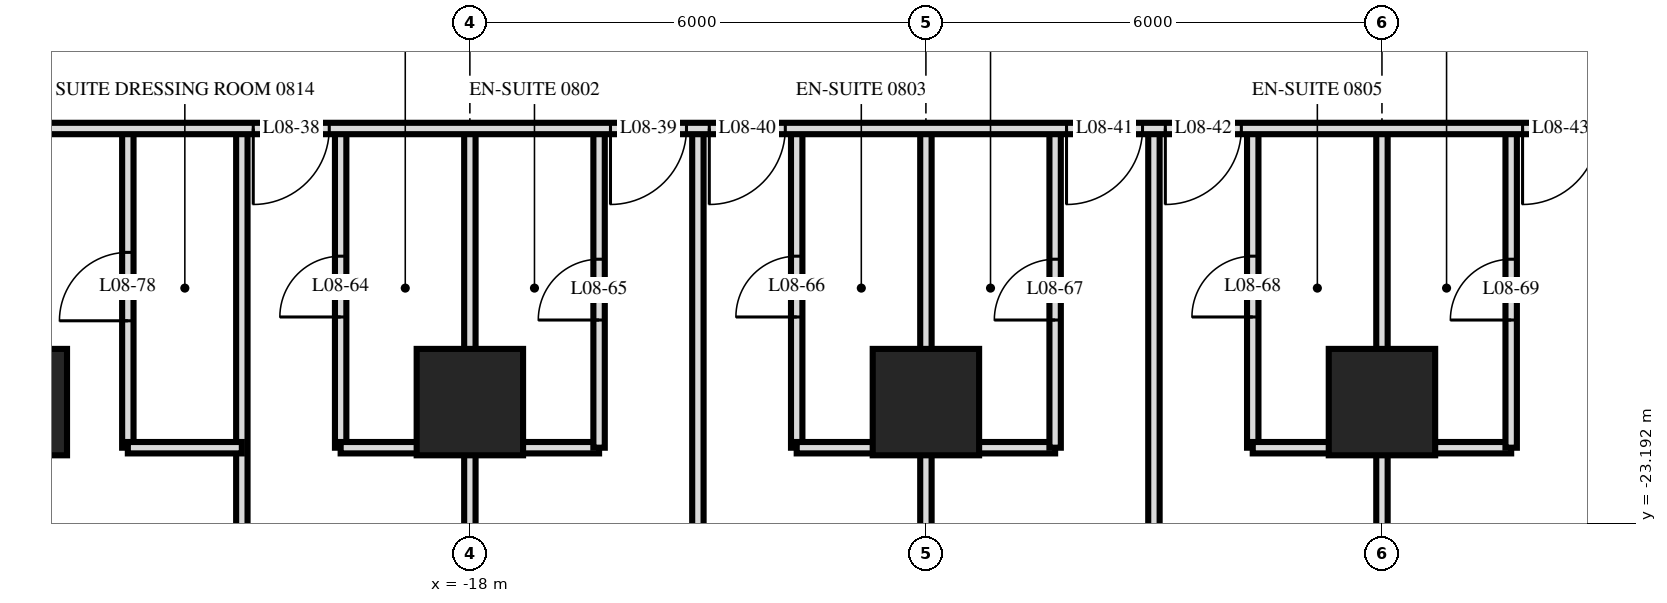
"""IFC4 building model, lengths in metres.
Left out: names, types, materials, properties, quantities, classifications, styles, units other than length and angle.
Written with IfcOpenShell. Run it as: python <this file> out.ifc"""

import sys

from ifc_helpers import new_model, si_unit, direction, frame, frame_2d, origin, origin_2d, place, context, subcontext, project, spatial, rectangle, extrude, element, fill, save


model = new_model("IFC4")
c1 = context("Model", 3, precision=1e-05, world=origin(), true_north=direction((0.0, 1.0)))
c2 = subcontext(c1, "Body", "Model", "MODEL_VIEW")
j1 = project(units=[si_unit("LENGTHUNIT", "METRE"), si_unit("PLANEANGLEUNIT", "RADIAN")], contexts=[c1])
p1 = place(None, origin())
s1 = spatial("IfcSite", under=j1, at=p1, CompositionType="ELEMENT")
p2 = place(p1, origin())
s2 = spatial("IfcBuilding", under=s1, at=p2, CompositionType="ELEMENT")
p3 = place(p2, frame((0.0, 0.0, 38.4)))
s3 = spatial("IfcBuildingStorey", under=s2, at=p3, CompositionType="ELEMENT", Elevation=38.4)
for number, where, z_axis, x_axis in (
    (1, (-24.0, -21.6, 0.0), (0.0, 0.0, 1.0), (1.0, 0.0, 0.0)),
    (2, (-18.0, -21.6, 0.0), (0.0, 0.0, 1.0), (1.0, 0.0, 0.0)),
    (3, (-12.0, -21.6, 0.0), (0.0, 0.0, 1.0), (1.0, 0.0, 0.0)),
    (4, (-6.0, -21.6, 0.0), (0.0, 0.0, 1.0), (1.0, 0.0, 0.0)),
):
    element("IfcColumn", number, at=place(p3, frame(where, z_axis=z_axis, x_axis=x_axis)), inside=s3, PredefinedType="COLUMN", context=c2, shape_type="SweptSolid", body=[
        extrude(rectangle(XDim=1.4, YDim=1.4, at=origin_2d()), origin(), (0.0, 0.0, 1.0), 3.6),
    ])
p4 = place(p3, frame((-4.3, -22.2, 0.0), z_axis=(0.0, 0.0, 1.0), x_axis=(0.0, 1.0, 0.0)))
e5 = element("IfcWall", 5, at=p4, inside=s3, PredefinedType="PARTITIONING", context=c2, shape_type="SweptSolid", body=[
    extrude(rectangle(XDim=4.2, YDim=0.15, at=frame_2d((2.1, 0.0))), origin(), (0.0, 0.0, 1.0), 3.32),
])
p5 = place(p4, frame((1.68, 0.0, 0.0)))
e6 = element("IfcOpeningElement", 6, at=p5, cuts=e5, PredefinedType="OPENING", context=c2, shape_type="SweptSolid", body=[
    extrude(rectangle(XDim=0.8, YDim=2.1, at=frame_2d((0.4, 1.05))), frame((0.0, 0.085, 0.0), z_axis=(0.0, -1.0, 0.0), x_axis=(1.0, 0.0, 0.0)), (0.0, 0.0, 1.0), 0.17),
])
p6 = place(p3, frame((-6.0, -29.22, 0.0), z_axis=(0.0, 0.0, 1.0), x_axis=(0.0, 1.0, 0.0)))
e7 = element("IfcWall", 7, at=p6, inside=s3, PredefinedType="PARTITIONING", context=c2, shape_type="SweptSolid", body=[
    extrude(rectangle(XDim=11.22, YDim=0.15, at=frame_2d((5.61, 0.0))), origin(), (0.0, 0.0, 1.0), 3.32),
])
p7 = place(p3, frame((-7.7, -22.2, 0.0), z_axis=(0.0, 0.0, 1.0), x_axis=(0.0, 1.0, 0.0)))
e8 = element("IfcWall", 8, at=p7, inside=s3, PredefinedType="PARTITIONING", context=c2, shape_type="SweptSolid", body=[
    extrude(rectangle(XDim=4.2, YDim=0.15, at=frame_2d((2.1, 0.0))), origin(), (0.0, 0.0, 1.0), 3.32),
])
p8 = place(p7, frame((1.72, 0.0, 0.0)))
e9 = element("IfcOpeningElement", 9, at=p8, cuts=e8, PredefinedType="OPENING", context=c2, shape_type="SweptSolid", body=[
    extrude(rectangle(XDim=0.8, YDim=2.1, at=frame_2d((0.4, 1.05))), frame((0.0, 0.085, 0.0), z_axis=(0.0, -1.0, 0.0), x_axis=(1.0, 0.0, 0.0)), (0.0, 0.0, 1.0), 0.17),
])
p9 = place(p3, frame((-9.0, -29.22, 0.0), z_axis=(0.0, 0.0, 1.0), x_axis=(0.0, 1.0, 0.0)))
e10 = element("IfcWall", 10, at=p9, inside=s3, PredefinedType="PARTITIONING", context=c2, shape_type="SweptSolid", body=[
    extrude(rectangle(XDim=11.22, YDim=0.15, at=frame_2d((5.61, 0.0))), origin(), (0.0, 0.0, 1.0), 3.32),
])
p10 = place(p3, frame((-10.3, -22.2, 0.0), z_axis=(0.0, 0.0, 1.0), x_axis=(0.0, 1.0, 0.0)))
e11 = element("IfcWall", 11, at=p10, inside=s3, PredefinedType="PARTITIONING", context=c2, shape_type="SweptSolid", body=[
    extrude(rectangle(XDim=4.2, YDim=0.15, at=frame_2d((2.1, 0.0))), origin(), (0.0, 0.0, 1.0), 3.32),
])
p11 = place(p10, frame((1.68, 0.0, 0.0)))
e12 = element("IfcOpeningElement", 12, at=p11, cuts=e11, PredefinedType="OPENING", context=c2, shape_type="SweptSolid", body=[
    extrude(rectangle(XDim=0.8, YDim=2.1, at=frame_2d((0.4, 1.05))), frame((0.0, 0.085, 0.0), z_axis=(0.0, -1.0, 0.0), x_axis=(1.0, 0.0, 0.0)), (0.0, 0.0, 1.0), 0.17),
])
p12 = place(p3, frame((-12.0, -29.22, 0.0), z_axis=(0.0, 0.0, 1.0), x_axis=(0.0, 1.0, 0.0)))
e13 = element("IfcWall", 13, at=p12, inside=s3, PredefinedType="PARTITIONING", context=c2, shape_type="SweptSolid", body=[
    extrude(rectangle(XDim=11.22, YDim=0.15, at=frame_2d((5.61, 0.0))), origin(), (0.0, 0.0, 1.0), 3.32),
])
p13 = place(p3, frame((-13.7, -22.2, 0.0), z_axis=(0.0, 0.0, 1.0), x_axis=(0.0, 1.0, 0.0)))
e14 = element("IfcWall", 14, at=p13, inside=s3, PredefinedType="PARTITIONING", context=c2, shape_type="SweptSolid", body=[
    extrude(rectangle(XDim=4.2, YDim=0.15, at=frame_2d((2.1, 0.0))), origin(), (0.0, 0.0, 1.0), 3.32),
])
p14 = place(p13, frame((1.72, 0.0, 0.0)))
e15 = element("IfcOpeningElement", 15, at=p14, cuts=e14, PredefinedType="OPENING", context=c2, shape_type="SweptSolid", body=[
    extrude(rectangle(XDim=0.8, YDim=2.1, at=frame_2d((0.4, 1.05))), frame((0.0, 0.085, 0.0), z_axis=(0.0, -1.0, 0.0), x_axis=(1.0, 0.0, 0.0)), (0.0, 0.0, 1.0), 0.17),
])
p15 = place(p3, frame((-15.0, -29.22, 0.0), z_axis=(0.0, 0.0, 1.0), x_axis=(0.0, 1.0, 0.0)))
e16 = element("IfcWall", 16, at=p15, inside=s3, PredefinedType="PARTITIONING", context=c2, shape_type="SweptSolid", body=[
    extrude(rectangle(XDim=11.22, YDim=0.15, at=frame_2d((5.61, 0.0))), origin(), (0.0, 0.0, 1.0), 3.32),
])
p16 = place(p3, frame((-16.3, -22.2, 0.0), z_axis=(0.0, 0.0, 1.0), x_axis=(0.0, 1.0, 0.0)))
e17 = element("IfcWall", 17, at=p16, inside=s3, PredefinedType="PARTITIONING", context=c2, shape_type="SweptSolid", body=[
    extrude(rectangle(XDim=4.2, YDim=0.15, at=frame_2d((2.1, 0.0))), origin(), (0.0, 0.0, 1.0), 3.32),
])
p17 = place(p16, frame((1.68, 0.0, 0.0)))
e18 = element("IfcOpeningElement", 18, at=p17, cuts=e17, PredefinedType="OPENING", context=c2, shape_type="SweptSolid", body=[
    extrude(rectangle(XDim=0.8, YDim=2.1, at=frame_2d((0.4, 1.05))), frame((0.0, 0.085, 0.0), z_axis=(0.0, -1.0, 0.0), x_axis=(1.0, 0.0, 0.0)), (0.0, 0.0, 1.0), 0.17),
])
p18 = place(p3, frame((-18.0, -29.22, 0.0), z_axis=(0.0, 0.0, 1.0), x_axis=(0.0, 1.0, 0.0)))
e19 = element("IfcWall", 19, at=p18, inside=s3, PredefinedType="PARTITIONING", context=c2, shape_type="SweptSolid", body=[
    extrude(rectangle(XDim=11.22, YDim=0.15, at=frame_2d((5.61, 0.0))), origin(), (0.0, 0.0, 1.0), 3.32),
])
p19 = place(p3, frame((-19.7, -22.2, 0.0), z_axis=(0.0, 0.0, 1.0), x_axis=(0.0, 1.0, 0.0)))
e20 = element("IfcWall", 20, at=p19, inside=s3, PredefinedType="PARTITIONING", context=c2, shape_type="SweptSolid", body=[
    extrude(rectangle(XDim=4.2, YDim=0.15, at=frame_2d((2.1, 0.0))), origin(), (0.0, 0.0, 1.0), 3.32),
])
p20 = place(p19, frame((1.72, 0.0, 0.0)))
e21 = element("IfcOpeningElement", 21, at=p20, cuts=e20, PredefinedType="OPENING", context=c2, shape_type="SweptSolid", body=[
    extrude(rectangle(XDim=0.8, YDim=2.1, at=frame_2d((0.4, 1.05))), frame((0.0, 0.085, 0.0), z_axis=(0.0, -1.0, 0.0), x_axis=(1.0, 0.0, 0.0)), (0.0, 0.0, 1.0), 0.17),
])
p21 = place(p3, frame((-21.0, -29.22, 0.0), z_axis=(0.0, 0.0, 1.0), x_axis=(0.0, 1.0, 0.0)))
e22 = element("IfcWall", 22, at=p21, inside=s3, PredefinedType="PARTITIONING", context=c2, shape_type="SweptSolid", body=[
    extrude(rectangle(XDim=11.22, YDim=0.15, at=frame_2d((5.61, 0.0))), origin(), (0.0, 0.0, 1.0), 3.32),
])
p22 = place(p3, frame((-22.5, -22.2, 0.0), z_axis=(0.0, 0.0, 1.0), x_axis=(0.0, 1.0, 0.0)))
e23 = element("IfcWall", 23, at=p22, inside=s3, PredefinedType="PARTITIONING", context=c2, shape_type="SweptSolid", body=[
    extrude(rectangle(XDim=4.2, YDim=0.15, at=frame_2d((2.1, 0.0))), origin(), (0.0, 0.0, 1.0), 3.32),
])
p23 = place(p22, frame((1.67, 0.0, 0.0)))
e24 = element("IfcOpeningElement", 24, at=p23, cuts=e23, PredefinedType="OPENING", context=c2, shape_type="SweptSolid", body=[
    extrude(rectangle(XDim=0.9, YDim=2.1, at=frame_2d((0.45, 1.05))), frame((0.0, 0.085, 0.0), z_axis=(0.0, -1.0, 0.0), x_axis=(1.0, 0.0, 0.0)), (0.0, 0.0, 1.0), 0.17),
])
p24 = place(p3, frame((-22.5, -22.2, 0.0), z_axis=(0.0, 0.0, 1.0), x_axis=(1.0, 0.0, 0.0)))
e25 = element("IfcWall", 25, at=p24, inside=s3, PredefinedType="PARTITIONING", context=c2, shape_type="SweptSolid", body=[
    extrude(rectangle(XDim=1.5, YDim=0.15, at=frame_2d((0.75, 0.0))), origin(), (0.0, 0.0, 1.0), 3.32),
])
for number, where, z_axis, x_axis in (
    (26, (-19.7, -22.2, 0.0), (0.0, 0.0, 1.0), (1.0, 0.0, 0.0)),
    (27, (-13.7, -22.2, 0.0), (0.0, 0.0, 1.0), (1.0, 0.0, 0.0)),
    (28, (-7.7, -22.2, 0.0), (0.0, 0.0, 1.0), (1.0, 0.0, 0.0)),
):
    element("IfcWall", number, at=place(p3, frame(where, z_axis=z_axis, x_axis=x_axis)), inside=s3, PredefinedType="PARTITIONING", context=c2, shape_type="SweptSolid", body=[
        extrude(rectangle(XDim=3.4, YDim=0.15, at=frame_2d((1.7, 0.0))), origin(), (0.0, 0.0, 1.0), 3.32),
    ])
p25 = place(p3, frame((-33.12, -18.0, 0.0), z_axis=(0.0, 0.0, 1.0), x_axis=(1.0, 0.0, 0.0)))
e29 = element("IfcWall", 29, at=p25, inside=s3, PredefinedType="PARTITIONING", context=c2, shape_type="SweptSolid", body=[
    extrude(rectangle(XDim=66.24, YDim=0.15, at=frame_2d((33.12, 0.0))), origin(), (0.0, 0.0, 1.0), 3.32),
])
p26 = place(p25, frame((12.27, 0.0, 0.0)))
e30 = element("IfcOpeningElement", 30, at=p26, cuts=e29, PredefinedType="OPENING", context=c2, shape_type="SweptSolid", body=[
    extrude(rectangle(XDim=1.0, YDim=2.1, at=frame_2d((0.5, 1.05))), frame((0.0, 0.085, 0.0), z_axis=(0.0, -1.0, 0.0), x_axis=(1.0, 0.0, 0.0)), (0.0, 0.0, 1.0), 0.17),
])
p27 = place(p25, frame((16.97, 0.0, 0.0)))
e31 = element("IfcOpeningElement", 31, at=p27, cuts=e29, PredefinedType="OPENING", context=c2, shape_type="SweptSolid", body=[
    extrude(rectangle(XDim=1.0, YDim=2.1, at=frame_2d((0.5, 1.05))), frame((0.0, 0.085, 0.0), z_axis=(0.0, -1.0, 0.0), x_axis=(1.0, 0.0, 0.0)), (0.0, 0.0, 1.0), 0.17),
])
p28 = place(p25, frame((18.27, 0.0, 0.0)))
e32 = element("IfcOpeningElement", 32, at=p28, cuts=e29, PredefinedType="OPENING", context=c2, shape_type="SweptSolid", body=[
    extrude(rectangle(XDim=1.0, YDim=2.1, at=frame_2d((0.5, 1.05))), frame((0.0, 0.085, 0.0), z_axis=(0.0, -1.0, 0.0), x_axis=(1.0, 0.0, 0.0)), (0.0, 0.0, 1.0), 0.17),
])
p29 = place(p25, frame((22.97, 0.0, 0.0)))
e33 = element("IfcOpeningElement", 33, at=p29, cuts=e29, PredefinedType="OPENING", context=c2, shape_type="SweptSolid", body=[
    extrude(rectangle(XDim=1.0, YDim=2.1, at=frame_2d((0.5, 1.05))), frame((0.0, 0.085, 0.0), z_axis=(0.0, -1.0, 0.0), x_axis=(1.0, 0.0, 0.0)), (0.0, 0.0, 1.0), 0.17),
])
p30 = place(p25, frame((24.27, 0.0, 0.0)))
e34 = element("IfcOpeningElement", 34, at=p30, cuts=e29, PredefinedType="OPENING", context=c2, shape_type="SweptSolid", body=[
    extrude(rectangle(XDim=1.0, YDim=2.1, at=frame_2d((0.5, 1.05))), frame((0.0, 0.085, 0.0), z_axis=(0.0, -1.0, 0.0), x_axis=(1.0, 0.0, 0.0)), (0.0, 0.0, 1.0), 0.17),
])
p31 = place(p25, frame((28.97, 0.0, 0.0)))
e35 = element("IfcOpeningElement", 35, at=p31, cuts=e29, PredefinedType="OPENING", context=c2, shape_type="SweptSolid", body=[
    extrude(rectangle(XDim=1.0, YDim=2.1, at=frame_2d((0.5, 1.05))), frame((0.0, 0.085, 0.0), z_axis=(0.0, -1.0, 0.0), x_axis=(1.0, 0.0, 0.0)), (0.0, 0.0, 1.0), 0.17),
])
p32 = place(p25, frame((30.27, 0.0, 0.0)))
e36 = element("IfcOpeningElement", 36, at=p32, cuts=e29, PredefinedType="OPENING", context=c2, shape_type="SweptSolid", body=[
    extrude(rectangle(XDim=1.0, YDim=2.1, at=frame_2d((0.5, 1.05))), frame((0.0, 0.085, 0.0), z_axis=(0.0, -1.0, 0.0), x_axis=(1.0, 0.0, 0.0)), (0.0, 0.0, 1.0), 0.17),
])
p33 = place(p25, frame((34.97, 0.0, 0.0)))
e37 = element("IfcOpeningElement", 37, at=p33, cuts=e29, PredefinedType="OPENING", context=c2, shape_type="SweptSolid", body=[
    extrude(rectangle(XDim=1.0, YDim=2.1, at=frame_2d((0.5, 1.05))), frame((0.0, 0.085, 0.0), z_axis=(0.0, -1.0, 0.0), x_axis=(1.0, 0.0, 0.0)), (0.0, 0.0, 1.0), 0.17),
])
p34 = place(p25, frame((37.27, 0.0, 0.0)))
e38 = element("IfcOpeningElement", 38, at=p34, cuts=e29, PredefinedType="OPENING", context=c2, shape_type="SweptSolid", body=[
    extrude(rectangle(XDim=1.0, YDim=2.1, at=frame_2d((0.5, 1.05))), frame((0.0, 0.085, 0.0), z_axis=(0.0, -1.0, 0.0), x_axis=(1.0, 0.0, 0.0)), (0.0, 0.0, 1.0), 0.17),
])
p35 = place(p25, frame((43.97, 0.0, 0.0)))
e39 = element("IfcOpeningElement", 39, at=p35, cuts=e29, PredefinedType="OPENING", context=c2, shape_type="SweptSolid", body=[
    extrude(rectangle(XDim=1.0, YDim=2.1, at=frame_2d((0.5, 1.05))), frame((0.0, 0.085, 0.0), z_axis=(0.0, -1.0, 0.0), x_axis=(1.0, 0.0, 0.0)), (0.0, 0.0, 1.0), 0.17),
])
p36 = place(p25, frame((45.27, 0.0, 0.0)))
e40 = element("IfcOpeningElement", 40, at=p36, cuts=e29, PredefinedType="OPENING", context=c2, shape_type="SweptSolid", body=[
    extrude(rectangle(XDim=1.0, YDim=2.1, at=frame_2d((0.5, 1.05))), frame((0.0, 0.085, 0.0), z_axis=(0.0, -1.0, 0.0), x_axis=(1.0, 0.0, 0.0)), (0.0, 0.0, 1.0), 0.17),
])
p37 = place(p25, frame((51.22, 0.0, 0.0)))
e41 = element("IfcOpeningElement", 41, at=p37, cuts=e29, PredefinedType="OPENING", context=c2, shape_type="SweptSolid", body=[
    extrude(rectangle(XDim=1.0, YDim=2.1, at=frame_2d((0.5, 1.05))), frame((0.0, 0.085, 0.0), z_axis=(0.0, -1.0, 0.0), x_axis=(1.0, 0.0, 0.0)), (0.0, 0.0, 1.0), 0.17),
])
p38 = place(p25, frame((54.27, 0.0, 0.0)))
e42 = element("IfcOpeningElement", 42, at=p38, cuts=e29, PredefinedType="OPENING", context=c2, shape_type="SweptSolid", body=[
    extrude(rectangle(XDim=1.0, YDim=2.1, at=frame_2d((0.5, 1.05))), frame((0.0, 0.085, 0.0), z_axis=(0.0, -1.0, 0.0), x_axis=(1.0, 0.0, 0.0)), (0.0, 0.0, 1.0), 0.17),
])
p39 = place(p25, frame((6.07, 0.0, 0.0)))
e43 = element("IfcOpeningElement", 43, at=p39, cuts=e29, PredefinedType="OPENING", context=c2, shape_type="SweptSolid", body=[
    extrude(rectangle(XDim=1.0, YDim=2.1, at=frame_2d((0.5, 1.05))), frame((0.0, 0.085, 0.0), z_axis=(0.0, -1.0, 0.0), x_axis=(1.0, 0.0, 0.0)), (0.0, 0.0, 1.0), 0.17),
])
p40 = place(p25, frame((63.37, 0.0, 0.0)))
e44 = element("IfcOpeningElement", 44, at=p40, cuts=e29, PredefinedType="OPENING", context=c2, shape_type="SweptSolid", body=[
    extrude(rectangle(XDim=1.0, YDim=2.1, at=frame_2d((0.5, 1.05))), frame((0.0, 0.085, 0.0), z_axis=(0.0, -1.0, 0.0), x_axis=(1.0, 0.0, 0.0)), (0.0, 0.0, 1.0), 0.17),
])
p41 = place(p26, frame((0.5, 0.0, 0.0), z_axis=(0.0, 0.0, 1.0), x_axis=(-1.0, 0.0, 0.0)))
e45 = element("IfcDoor", 45, at=p41, inside=s3, OperationType="SINGLE_SWING_LEFT", PredefinedType="DOOR", context=c2, shape_type="SweptSolid", body=[
    extrude(rectangle(XDim=1.0, YDim=2.1, at=frame_2d((0.0, 1.05))), frame((0.0, -0.025, 0.0), z_axis=(0.0, 1.0, 0.0), x_axis=(-1.0, 0.0, 0.0)), (0.0, 0.0, 1.0), 0.05),
])
fill(e30, e45)
p42 = place(p27, frame((0.5, 0.0, 0.0), z_axis=(0.0, 0.0, 1.0), x_axis=(-1.0, 0.0, 0.0)))
e46 = element("IfcDoor", 46, at=p42, inside=s3, OperationType="SINGLE_SWING_LEFT", PredefinedType="DOOR", context=c2, shape_type="SweptSolid", body=[
    extrude(rectangle(XDim=1.0, YDim=2.1, at=frame_2d((0.0, 1.05))), frame((0.0, -0.025, 0.0), z_axis=(0.0, 1.0, 0.0), x_axis=(-1.0, 0.0, 0.0)), (0.0, 0.0, 1.0), 0.05),
])
fill(e31, e46)
p43 = place(p28, frame((0.5, 0.0, 0.0), z_axis=(0.0, 0.0, 1.0), x_axis=(-1.0, 0.0, 0.0)))
e47 = element("IfcDoor", 47, at=p43, inside=s3, OperationType="SINGLE_SWING_LEFT", PredefinedType="DOOR", context=c2, shape_type="SweptSolid", body=[
    extrude(rectangle(XDim=1.0, YDim=2.1, at=frame_2d((0.0, 1.05))), frame((0.0, -0.025, 0.0), z_axis=(0.0, 1.0, 0.0), x_axis=(-1.0, 0.0, 0.0)), (0.0, 0.0, 1.0), 0.05),
])
fill(e32, e47)
p44 = place(p29, frame((0.5, 0.0, 0.0), z_axis=(0.0, 0.0, 1.0), x_axis=(-1.0, 0.0, 0.0)))
e48 = element("IfcDoor", 48, at=p44, inside=s3, OperationType="SINGLE_SWING_LEFT", PredefinedType="DOOR", context=c2, shape_type="SweptSolid", body=[
    extrude(rectangle(XDim=1.0, YDim=2.1, at=frame_2d((0.0, 1.05))), frame((0.0, -0.025, 0.0), z_axis=(0.0, 1.0, 0.0), x_axis=(-1.0, 0.0, 0.0)), (0.0, 0.0, 1.0), 0.05),
])
fill(e33, e48)
p45 = place(p30, frame((0.5, 0.0, 0.0), z_axis=(0.0, 0.0, 1.0), x_axis=(-1.0, 0.0, 0.0)))
e49 = element("IfcDoor", 49, at=p45, inside=s3, OperationType="SINGLE_SWING_LEFT", PredefinedType="DOOR", context=c2, shape_type="SweptSolid", body=[
    extrude(rectangle(XDim=1.0, YDim=2.1, at=frame_2d((0.0, 1.05))), frame((0.0, -0.025, 0.0), z_axis=(0.0, 1.0, 0.0), x_axis=(-1.0, 0.0, 0.0)), (0.0, 0.0, 1.0), 0.05),
])
fill(e34, e49)
p46 = place(p31, frame((0.5, 0.0, 0.0), z_axis=(0.0, 0.0, 1.0), x_axis=(-1.0, 0.0, 0.0)))
e50 = element("IfcDoor", 50, at=p46, inside=s3, OperationType="SINGLE_SWING_LEFT", PredefinedType="DOOR", context=c2, shape_type="SweptSolid", body=[
    extrude(rectangle(XDim=1.0, YDim=2.1, at=frame_2d((0.0, 1.05))), frame((0.0, -0.025, 0.0), z_axis=(0.0, 1.0, 0.0), x_axis=(-1.0, 0.0, 0.0)), (0.0, 0.0, 1.0), 0.05),
])
fill(e35, e50)
p47 = place(p20, origin())
e51 = element("IfcDoor", 51, at=p47, inside=s3, OperationType="SINGLE_SWING_RIGHT", PredefinedType="DOOR", context=c2, shape_type="SweptSolid", body=[
    extrude(rectangle(XDim=0.8, YDim=2.1, at=frame_2d((0.4, 1.05))), frame((0.0, 0.025, 0.0), z_axis=(0.0, -1.0, 0.0), x_axis=(1.0, 0.0, 0.0)), (0.0, 0.0, 1.0), 0.05),
])
fill(e21, e51)
p48 = place(p17, origin())
e52 = element("IfcDoor", 52, at=p48, inside=s3, OperationType="SINGLE_SWING_RIGHT", PredefinedType="DOOR", context=c2, shape_type="SweptSolid", body=[
    extrude(rectangle(XDim=0.8, YDim=2.1, at=frame_2d((0.4, 1.05))), frame((0.0, 0.025, 0.0), z_axis=(0.0, -1.0, 0.0), x_axis=(1.0, 0.0, 0.0)), (0.0, 0.0, 1.0), 0.05),
])
fill(e18, e52)
p49 = place(p14, origin())
e53 = element("IfcDoor", 53, at=p49, inside=s3, OperationType="SINGLE_SWING_RIGHT", PredefinedType="DOOR", context=c2, shape_type="SweptSolid", body=[
    extrude(rectangle(XDim=0.8, YDim=2.1, at=frame_2d((0.4, 1.05))), frame((0.0, 0.025, 0.0), z_axis=(0.0, -1.0, 0.0), x_axis=(1.0, 0.0, 0.0)), (0.0, 0.0, 1.0), 0.05),
])
fill(e15, e53)
p50 = place(p11, origin())
e54 = element("IfcDoor", 54, at=p50, inside=s3, OperationType="SINGLE_SWING_RIGHT", PredefinedType="DOOR", context=c2, shape_type="SweptSolid", body=[
    extrude(rectangle(XDim=0.8, YDim=2.1, at=frame_2d((0.4, 1.05))), frame((0.0, 0.025, 0.0), z_axis=(0.0, -1.0, 0.0), x_axis=(1.0, 0.0, 0.0)), (0.0, 0.0, 1.0), 0.05),
])
fill(e12, e54)
p51 = place(p8, origin())
e55 = element("IfcDoor", 55, at=p51, inside=s3, OperationType="SINGLE_SWING_RIGHT", PredefinedType="DOOR", context=c2, shape_type="SweptSolid", body=[
    extrude(rectangle(XDim=0.8, YDim=2.1, at=frame_2d((0.4, 1.05))), frame((0.0, 0.025, 0.0), z_axis=(0.0, -1.0, 0.0), x_axis=(1.0, 0.0, 0.0)), (0.0, 0.0, 1.0), 0.05),
])
fill(e9, e55)
p52 = place(p5, origin())
e56 = element("IfcDoor", 56, at=p52, inside=s3, OperationType="SINGLE_SWING_RIGHT", PredefinedType="DOOR", context=c2, shape_type="SweptSolid", body=[
    extrude(rectangle(XDim=0.8, YDim=2.1, at=frame_2d((0.4, 1.05))), frame((0.0, 0.025, 0.0), z_axis=(0.0, -1.0, 0.0), x_axis=(1.0, 0.0, 0.0)), (0.0, 0.0, 1.0), 0.05),
])
fill(e6, e56)
p53 = place(p23, origin())
e57 = element("IfcDoor", 57, at=p53, inside=s3, OperationType="SINGLE_SWING_RIGHT", PredefinedType="DOOR", context=c2, shape_type="SweptSolid", body=[
    extrude(rectangle(XDim=0.9, YDim=2.1, at=frame_2d((0.45, 1.05))), frame((0.0, 0.025, 0.0), z_axis=(0.0, -1.0, 0.0), x_axis=(1.0, 0.0, 0.0)), (0.0, 0.0, 1.0), 0.05),
])
fill(e24, e57)
save(model, sys.argv[1])
